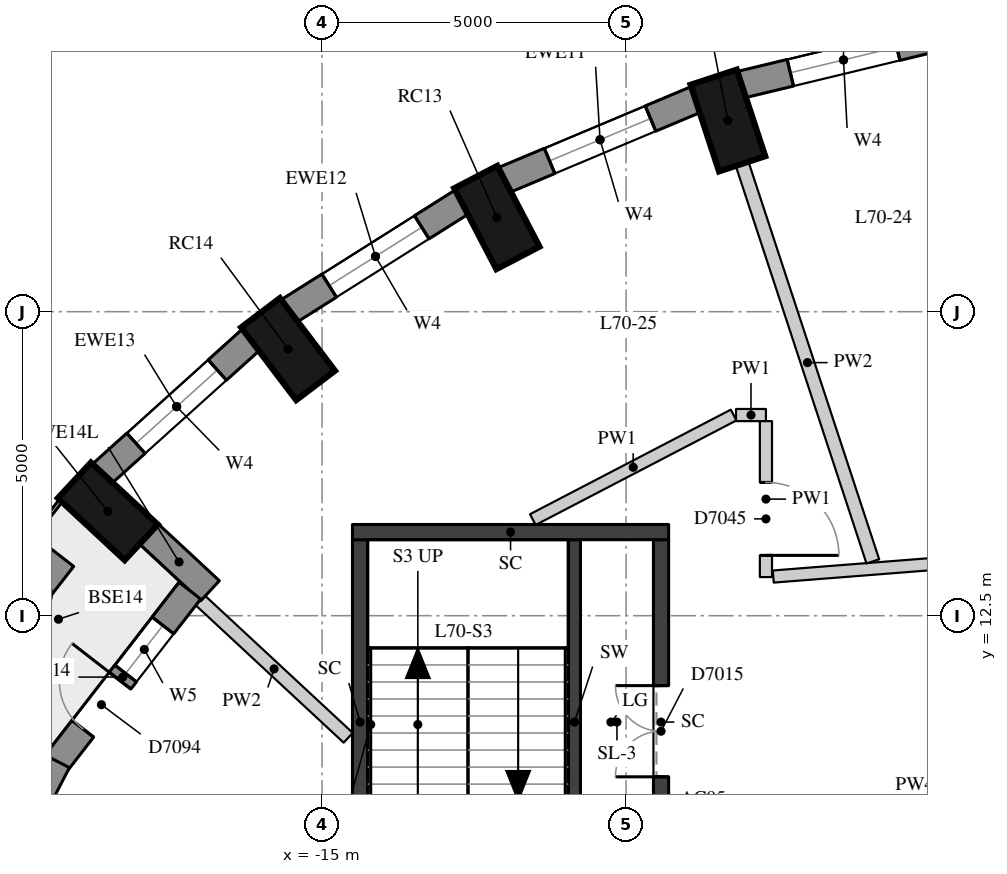
"""IFC4 building model, lengths in metres.
Left out: names, types, materials, properties, quantities, classifications, styles, units other than length and angle.
Written with IfcOpenShell. Run it as: python <this file> out.ifc"""

import sys

from ifc_helpers import new_model, si_unit, direction, frame, frame_2d, origin, origin_2d, place, context, subcontext, project, spatial, rectangle, extrude, element, fill, save


model = new_model("IFC4")
c1 = context("Model", 3, precision=1e-05, world=origin(), true_north=direction((0.0, 1.0)))
c2 = subcontext(c1, "Body", "Model", "MODEL_VIEW")
j1 = project(units=[si_unit("LENGTHUNIT", "METRE"), si_unit("PLANEANGLEUNIT", "RADIAN")], contexts=[c1])
p1 = place(None, origin())
s1 = spatial("IfcSite", under=j1, at=p1, CompositionType="ELEMENT")
p2 = place(p1, origin())
s2 = spatial("IfcBuilding", under=s1, at=p2, CompositionType="ELEMENT")
p3 = place(p2, frame((0.0, 0.0, 246.5)))
s3 = spatial("IfcBuildingStorey", under=s2, at=p3, CompositionType="ELEMENT", Elevation=246.5)
for number, where, z_axis, x_axis in (
    (1, (-8.326, 20.644, 0.0), (0.0, 0.0, 1.0), (-0.312, 0.95, 0.0)),
    (2, (-12.125, 19.05, 0.0), (0.0, 0.0, 1.0), (-0.462, 0.887, 0.0)),
    (3, (-15.559, 16.885, 0.0), (0.0, 0.0, 1.0), (-0.604, 0.797, 0.0)),
    (4, (-18.523, 14.216, 0.0), (0.0, 0.0, 1.0), (-0.733, 0.681, 0.0)),
):
    element("IfcColumn", number, at=place(p3, frame(where, z_axis=z_axis, x_axis=x_axis)), inside=s3, PredefinedType="COLUMN", context=c2, shape_type="SweptSolid", body=[
        extrude(rectangle(XDim=1.5, YDim=0.8, at=origin_2d()), origin(), (0.0, 0.0, 1.0), 3.3),
    ])
p4 = place(p3, frame((-4.729, 22.05, 0.0), z_axis=(0.0, 0.0, 1.0), x_axis=(-0.972099278496, -0.23456980357, 0.0)))
e5 = element("IfcWall", 5, at=p4, inside=s3, PredefinedType="SOLIDWALL", context=c2, shape_type="SweptSolid", body=[
    extrude(rectangle(XDim=3.487, YDim=0.45, at=frame_2d((1.743, 0.0))), origin(), (0.0, 0.0, 1.0), 3.02),
])
p5 = place(p4, frame((0.843, 0.0, 0.4)))
e6 = element("IfcOpeningElement", 6, at=p5, cuts=e5, PredefinedType="OPENING", context=c2, shape_type="SweptSolid", body=[
    extrude(rectangle(XDim=1.8, YDim=1.75, at=frame_2d((0.9, 0.875))), frame((0.0, 0.235, 0.0), z_axis=(0.0, -1.0, 0.0), x_axis=(1.0, 0.0, 0.0)), (0.0, 0.0, 1.0), 0.47),
])
p6 = place(p3, frame((-8.841, 20.995, 0.0), z_axis=(0.0, 0.0, 1.0), x_axis=(-0.922024627475, -0.387131226239, 0.0)))
e7 = element("IfcWall", 7, at=p6, inside=s3, PredefinedType="SOLIDWALL", context=c2, shape_type="SweptSolid", body=[
    extrude(rectangle(XDim=3.443, YDim=0.45, at=frame_2d((1.722, 0.0))), origin(), (0.0, 0.0, 1.0), 3.02),
])
p7 = place(p6, frame((0.822, 0.0, 0.4)))
e8 = element("IfcOpeningElement", 8, at=p7, cuts=e7, PredefinedType="OPENING", context=c2, shape_type="SweptSolid", body=[
    extrude(rectangle(XDim=1.8, YDim=1.75, at=frame_2d((0.9, 0.875))), frame((0.0, 0.235, 0.0), z_axis=(0.0, -1.0, 0.0), x_axis=(1.0, 0.0, 0.0)), (0.0, 0.0, 1.0), 0.47),
])
p8 = place(p3, frame((-12.69, 19.311, 0.0), z_axis=(0.0, 0.0, 1.0), x_axis=(-0.845929139811, -0.53329531258, 0.0)))
e9 = element("IfcWall", 9, at=p8, inside=s3, PredefinedType="SOLIDWALL", context=c2, shape_type="SweptSolid", body=[
    extrude(rectangle(XDim=3.385, YDim=0.45, at=frame_2d((1.692, 0.0))), origin(), (0.0, 0.0, 1.0), 3.02),
])
p9 = place(p8, frame((0.792, 0.0, 0.4)))
e10 = element("IfcOpeningElement", 10, at=p9, cuts=e9, PredefinedType="OPENING", context=c2, shape_type="SweptSolid", body=[
    extrude(rectangle(XDim=1.8, YDim=1.75, at=frame_2d((0.9, 0.875))), frame((0.0, 0.235, 0.0), z_axis=(0.0, -1.0, 0.0), x_axis=(1.0, 0.0, 0.0)), (0.0, 0.0, 1.0), 0.47),
])
p10 = place(p3, frame((-16.159, 17.047, 0.0), z_axis=(0.0, 0.0, 1.0), x_axis=(-0.743166014219, -0.669107073128, 0.0)))
e11 = element("IfcWall", 11, at=p10, inside=s3, PredefinedType="SOLIDWALL", context=c2, shape_type="SweptSolid", body=[
    extrude(rectangle(XDim=3.316, YDim=0.45, at=frame_2d((1.658, 0.0))), origin(), (0.0, 0.0, 1.0), 3.02),
])
p11 = place(p10, frame((0.758, 0.0, 0.4)))
e12 = element("IfcOpeningElement", 12, at=p11, cuts=e11, PredefinedType="OPENING", context=c2, shape_type="SweptSolid", body=[
    extrude(rectangle(XDim=1.8, YDim=1.75, at=frame_2d((0.9, 0.875))), frame((0.0, 0.235, 0.0), z_axis=(0.0, -1.0, 0.0), x_axis=(1.0, 0.0, 0.0)), (0.0, 0.0, 1.0), 0.47),
])
p12 = place(p3, frame((-17.861, 13.857, 0.0), z_axis=(0.0, 0.0, 1.0), x_axis=(0.732605925603, -0.680653037731, 0.0)))
e13 = element("IfcWall", 13, at=p12, inside=s3, PredefinedType="SOLIDWALL", context=c2, shape_type="SweptSolid", body=[
    extrude(rectangle(XDim=1.391, YDim=0.45, at=frame_2d((0.695, 0.0))), origin(), (0.0, 0.0, 1.0), 3.02),
])
p13 = place(p3, frame((-17.174, 12.911, 0.0), z_axis=(0.0, 0.0, 1.0), x_axis=(-0.612774197557, -0.79025804824, 0.0)))
e14 = element("IfcWall", 14, at=p13, inside=s3, PredefinedType="SOLIDWALL", context=c2, shape_type="SweptSolid", body=[
    extrude(rectangle(XDim=3.596, YDim=0.45, at=frame_2d((1.798, 0.0))), origin(), (0.0, 0.0, 1.0), 3.02),
])
p14 = place(p13, frame((0.723, 0.0, 0.4)))
e15 = element("IfcOpeningElement", 15, at=p14, cuts=e14, PredefinedType="OPENING", context=c2, shape_type="SweptSolid", body=[
    extrude(rectangle(XDim=1.0, YDim=1.75, at=frame_2d((0.5, 0.875))), frame((0.0, 0.235, 0.0), z_axis=(0.0, -1.0, 0.0), x_axis=(1.0, 0.0, 0.0)), (0.0, 0.0, 1.0), 0.47),
])
p15 = place(p13, frame((1.873, 0.0, 0.0)))
e16 = element("IfcOpeningElement", 16, at=p15, cuts=e14, PredefinedType="OPENING", context=c2, shape_type="SweptSolid", body=[
    extrude(rectangle(XDim=1.0, YDim=2.15, at=frame_2d((0.5, 1.075))), frame((0.0, 0.235, 0.0), z_axis=(0.0, -1.0, 0.0), x_axis=(1.0, 0.0, 0.0)), (0.0, 0.0, 1.0), 0.47),
])
p16 = place(p3, frame((-19.355, 10.104, 0.0), z_axis=(0.0, 0.0, 1.0), x_axis=(-0.458852093952, -0.888512665006, 0.0)))
e17 = element("IfcWall", 17, at=p16, inside=s3, PredefinedType="SOLIDWALL", context=c2, shape_type="SweptSolid", body=[
    extrude(rectangle(XDim=3.538, YDim=0.45, at=frame_2d((1.769, 0.0))), origin(), (0.0, 0.0, 1.0), 3.02),
])
p17 = place(p16, frame((0.694, 0.0, 0.4)))
e18 = element("IfcOpeningElement", 18, at=p17, cuts=e17, PredefinedType="OPENING", context=c2, shape_type="SweptSolid", body=[
    extrude(rectangle(XDim=1.0, YDim=1.75, at=frame_2d((0.5, 0.875))), frame((0.0, 0.235, 0.0), z_axis=(0.0, -1.0, 0.0), x_axis=(1.0, 0.0, 0.0)), (0.0, 0.0, 1.0), 0.47),
])
p18 = place(p16, frame((1.844, 0.0, 0.0)))
e19 = element("IfcOpeningElement", 19, at=p18, cuts=e17, PredefinedType="OPENING", context=c2, shape_type="SweptSolid", body=[
    extrude(rectangle(XDim=1.0, YDim=2.15, at=frame_2d((0.5, 1.075))), frame((0.0, 0.235, 0.0), z_axis=(0.0, -1.0, 0.0), x_axis=(1.0, 0.0, 0.0)), (0.0, 0.0, 1.0), 0.47),
])
p19 = place(p3, frame((-19.361, 13.525, 0.0), z_axis=(0.0, 0.0, 1.0), x_axis=(-0.613884271235, -0.789396035923, 0.0)))
e20 = element("IfcWall", 20, at=p19, inside=s3, PredefinedType="USERDEFINED", context=c2, shape_type="SweptSolid", body=[
    extrude(rectangle(XDim=1.8, YDim=0.7, at=frame_2d((0.9, 0.0))), origin(), (0.0, 0.0, 1.0), 0.75),
])
p20 = place(p3, frame((-10.85, 7.75, 0.0), z_axis=(0.0, 0.0, 1.0), x_axis=(0.0, 1.0, 0.0)))
e21 = element("IfcWall", 21, at=p20, inside=s3, PredefinedType="SHEAR", context=c2, shape_type="SweptSolid", body=[
    extrude(rectangle(XDim=6.0, YDim=0.2, at=frame_2d((3.0, 0.0))), origin(), (0.0, 0.0, 1.0), 3.02),
])
p21 = place(p20, frame((0.1, 0.0, 0.0)))
e22 = element("IfcOpeningElement", 22, at=p21, cuts=e21, PredefinedType="OPENING", context=c2, shape_type="SweptSolid", body=[
    extrude(rectangle(XDim=1.5, YDim=2.1, at=frame_2d((0.75, 1.05))), frame((0.0, 0.11, 0.0), z_axis=(0.0, -1.0, 0.0), x_axis=(1.0, 0.0, 0.0)), (0.0, 0.0, 1.0), 0.22),
])
p22 = place(p3, frame((-14.375, 7.75, -0.28), z_axis=(0.0, 0.0, 1.0), x_axis=(0.0, 1.0, 0.0)))
e23 = element("IfcWall", 23, at=p22, inside=s3, PredefinedType="SHEAR", context=c2, shape_type="SweptSolid", body=[
    extrude(rectangle(XDim=6.0, YDim=0.25, at=frame_2d((3.0, 0.0))), origin(), (0.0, 0.0, 1.0), 3.3),
])
p23 = place(p3, frame((-9.425, 7.75, -0.28), z_axis=(0.0, 0.0, 1.0), x_axis=(0.0, 1.0, 0.0)))
e24 = element("IfcWall", 24, at=p23, inside=s3, PredefinedType="SHEAR", context=c2, shape_type="SweptSolid", body=[
    extrude(rectangle(XDim=6.0, YDim=0.25, at=frame_2d((3.0, 0.0))), origin(), (0.0, 0.0, 1.0), 3.3),
])
p24 = place(p23, frame((2.1, 0.0, 0.28)))
e25 = element("IfcOpeningElement", 25, at=p24, cuts=e24, PredefinedType="OPENING", context=c2, shape_type="SweptSolid", body=[
    extrude(rectangle(XDim=1.5, YDim=2.1, at=frame_2d((0.75, 1.05))), frame((0.0, 0.135, 0.0), z_axis=(0.0, -1.0, 0.0), x_axis=(1.0, 0.0, 0.0)), (0.0, 0.0, 1.0), 0.27),
])
p25 = place(p3, frame((-14.5, 13.875, -0.28), z_axis=(0.0, 0.0, 1.0), x_axis=(1.0, 0.0, 0.0)))
e26 = element("IfcWall", 26, at=p25, inside=s3, PredefinedType="SHEAR", context=c2, shape_type="SweptSolid", body=[
    extrude(rectangle(XDim=5.2, YDim=0.25, at=frame_2d((2.6, 0.0))), origin(), (0.0, 0.0, 1.0), 3.3),
])
p26 = place(p3, frame((-11.534, 14.081, 0.0), z_axis=(0.0, 0.0, 1.0), x_axis=(0.886975089277, 0.461817270143, 0.0)))
e27 = element("IfcWall", 27, at=p26, inside=s3, PredefinedType="PARTITIONING", context=c2, shape_type="SweptSolid", body=[
    extrude(rectangle(XDim=3.723, YDim=0.2, at=frame_2d((1.861, 0.0))), origin(), (0.0, 0.0, 1.0), 3.02),
])
p27 = place(p3, frame((-8.192, 15.8, 0.0), z_axis=(0.0, 0.0, 1.0), x_axis=(1.0, 0.0, 0.0)))
e28 = element("IfcWall", 28, at=p27, inside=s3, PredefinedType="PARTITIONING", context=c2, shape_type="SweptSolid", body=[
    extrude(rectangle(XDim=0.492, YDim=0.2, at=frame_2d((0.246, 0.0))), origin(), (0.0, 0.0, 1.0), 3.02),
])
p28 = place(p3, frame((-7.7, 15.7, 0.0), z_axis=(0.0, 0.0, 1.0), x_axis=(0.0, -1.0, 0.0)))
e29 = element("IfcWall", 29, at=p28, inside=s3, PredefinedType="PARTITIONING", context=c2, shape_type="SweptSolid", body=[
    extrude(rectangle(XDim=2.565, YDim=0.2, at=frame_2d((1.282, 0.0))), origin(), (0.0, 0.0, 1.0), 3.02),
])
p29 = place(p28, frame((1.008, 0.0, 0.0)))
e30 = element("IfcOpeningElement", 30, at=p29, cuts=e29, PredefinedType="OPENING", context=c2, shape_type="SweptSolid", body=[
    extrude(rectangle(XDim=1.2, YDim=2.1, at=frame_2d((0.6, 1.05))), frame((0.0, 0.11, 0.0), z_axis=(0.0, -1.0, 0.0), x_axis=(1.0, 0.0, 0.0)), (0.0, 0.0, 1.0), 0.22),
])
p30 = place(p3, frame((-7.58, 13.144, 0.0), z_axis=(0.0, 0.0, 1.0), x_axis=(0.996921908045, 0.078400951905, 0.0)))
e31 = element("IfcWall", 31, at=p30, inside=s3, PredefinedType="PARTITIONING", context=c2, shape_type="SweptSolid", body=[
    extrude(rectangle(XDim=10.482, YDim=0.2, at=frame_2d((5.241, 0.0))), origin(), (0.0, 0.0, 1.0), 2.57),
])
p31 = place(p30, frame((6.99, 0.0, 0.0)))
e32 = element("IfcOpeningElement", 32, at=p31, cuts=e31, PredefinedType="OPENING", context=c2, shape_type="SweptSolid", body=[
    extrude(rectangle(XDim=1.1, YDim=2.1, at=frame_2d((0.55, 1.05))), frame((0.0, 0.11, 0.0), z_axis=(0.0, -1.0, 0.0), x_axis=(1.0, 0.0, 0.0)), (0.0, 0.0, 1.0), 0.22),
])
p32 = place(p30, frame((2.696, 0.0, 0.0)))
e33 = element("IfcOpeningElement", 33, at=p32, cuts=e31, PredefinedType="OPENING", context=c2, shape_type="SweptSolid", body=[
    extrude(rectangle(XDim=0.9, YDim=2.1, at=frame_2d((0.45, 1.05))), frame((0.0, 0.11, 0.0), z_axis=(0.0, -1.0, 0.0), x_axis=(1.0, 0.0, 0.0)), (0.0, 0.0, 1.0), 0.22),
])
p33 = place(p3, frame((-8.091, 19.932, 0.0), z_axis=(0.0, 0.0, 1.0), x_axis=(0.312277225251, -0.949991018162, 0.0)))
e34 = element("IfcWall", 34, at=p33, inside=s3, PredefinedType="PARTITIONING", context=c2, shape_type="SweptSolid", body=[
    extrude(rectangle(XDim=6.883, YDim=0.22, at=frame_2d((3.441, 0.0))), origin(), (0.0, 0.0, 1.0), 3.02),
])
p34 = place(p3, frame((-17.009, 12.758, 0.0), z_axis=(0.0, 0.0, 1.0), x_axis=(0.732631495403, -0.680625515202, 0.0)))
e35 = element("IfcWall", 35, at=p34, inside=s3, PredefinedType="PARTITIONING", context=c2, shape_type="SweptSolid", body=[
    extrude(rectangle(XDim=3.328, YDim=0.22, at=frame_2d((1.664, 0.0))), origin(), (0.0, 0.0, 1.0), 3.02),
])
p35 = place(p5, origin())
e36 = element("IfcWindow", 36, at=p35, inside=s3, PartitioningType="SINGLE_PANEL", PredefinedType="WINDOW", context=c2, shape_type="SweptSolid", body=[
    extrude(rectangle(XDim=1.8, YDim=1.75, at=frame_2d((0.9, 0.875))), frame((0.0, 0.035, 0.0), z_axis=(0.0, -1.0, 0.0), x_axis=(1.0, 0.0, 0.0)), (0.0, 0.0, 1.0), 0.06),
])
fill(e6, e36)
p36 = place(p7, origin())
e37 = element("IfcWindow", 37, at=p36, inside=s3, PartitioningType="SINGLE_PANEL", PredefinedType="WINDOW", context=c2, shape_type="SweptSolid", body=[
    extrude(rectangle(XDim=1.8, YDim=1.75, at=frame_2d((0.9, 0.875))), frame((0.0, 0.035, 0.0), z_axis=(0.0, -1.0, 0.0), x_axis=(1.0, 0.0, 0.0)), (0.0, 0.0, 1.0), 0.06),
])
fill(e8, e37)
p37 = place(p9, origin())
e38 = element("IfcWindow", 38, at=p37, inside=s3, PartitioningType="SINGLE_PANEL", PredefinedType="WINDOW", context=c2, shape_type="SweptSolid", body=[
    extrude(rectangle(XDim=1.8, YDim=1.75, at=frame_2d((0.9, 0.875))), frame((0.0, 0.035, 0.0), z_axis=(0.0, -1.0, 0.0), x_axis=(1.0, 0.0, 0.0)), (0.0, 0.0, 1.0), 0.06),
])
fill(e10, e38)
p38 = place(p11, origin())
e39 = element("IfcWindow", 39, at=p38, inside=s3, PartitioningType="SINGLE_PANEL", PredefinedType="WINDOW", context=c2, shape_type="SweptSolid", body=[
    extrude(rectangle(XDim=1.8, YDim=1.75, at=frame_2d((0.9, 0.875))), frame((0.0, 0.035, 0.0), z_axis=(0.0, -1.0, 0.0), x_axis=(1.0, 0.0, 0.0)), (0.0, 0.0, 1.0), 0.06),
])
fill(e12, e39)
p39 = place(p14, origin())
e40 = element("IfcWindow", 40, at=p39, inside=s3, PartitioningType="SINGLE_PANEL", PredefinedType="WINDOW", context=c2, shape_type="SweptSolid", body=[
    extrude(rectangle(XDim=1.0, YDim=1.75, at=frame_2d((0.5, 0.875))), frame((0.0, 0.035, 0.0), z_axis=(0.0, -1.0, 0.0), x_axis=(1.0, 0.0, 0.0)), (0.0, 0.0, 1.0), 0.06),
])
fill(e15, e40)
p40 = place(p15, frame((1.0, 0.0, 0.0), z_axis=(0.0, 0.0, 1.0), x_axis=(-1.0, 0.0, 0.0)))
e41 = element("IfcDoor", 41, at=p40, inside=s3, OperationType="SINGLE_SWING_RIGHT", PredefinedType="DOOR", context=c2, shape_type="SweptSolid", body=[
    extrude(rectangle(XDim=1.0, YDim=2.15, at=frame_2d((0.5, 1.075))), frame((0.0, 0.075, 0.0), z_axis=(0.0, -1.0, 0.0), x_axis=(1.0, 0.0, 0.0)), (0.0, 0.0, 1.0), 0.05),
])
fill(e16, e41)
p41 = place(p24, origin())
e42 = element("IfcDoor", 42, at=p41, inside=s3, OperationType="DOUBLE_DOOR_SINGLE_SWING", PredefinedType="DOOR", context=c2, shape_type="SweptSolid", body=[
    extrude(rectangle(XDim=1.5, YDim=2.1, at=frame_2d((0.75, 1.05))), frame((0.0, 0.025, 0.0), z_axis=(0.0, -1.0, 0.0), x_axis=(1.0, 0.0, 0.0)), (0.0, 0.0, 1.0), 0.05),
])
fill(e25, e42)
p42 = place(p29, origin())
e43 = element("IfcDoor", 43, at=p42, inside=s3, OperationType="SINGLE_SWING_RIGHT", PredefinedType="DOOR", context=c2, shape_type="SweptSolid", body=[
    extrude(rectangle(XDim=1.2, YDim=2.1, at=frame_2d((0.6, 1.05))), frame((0.0, 0.025, 0.0), z_axis=(0.0, -1.0, 0.0), x_axis=(1.0, 0.0, 0.0)), (0.0, 0.0, 1.0), 0.05),
])
fill(e30, e43)
save(model, sys.argv[1])
